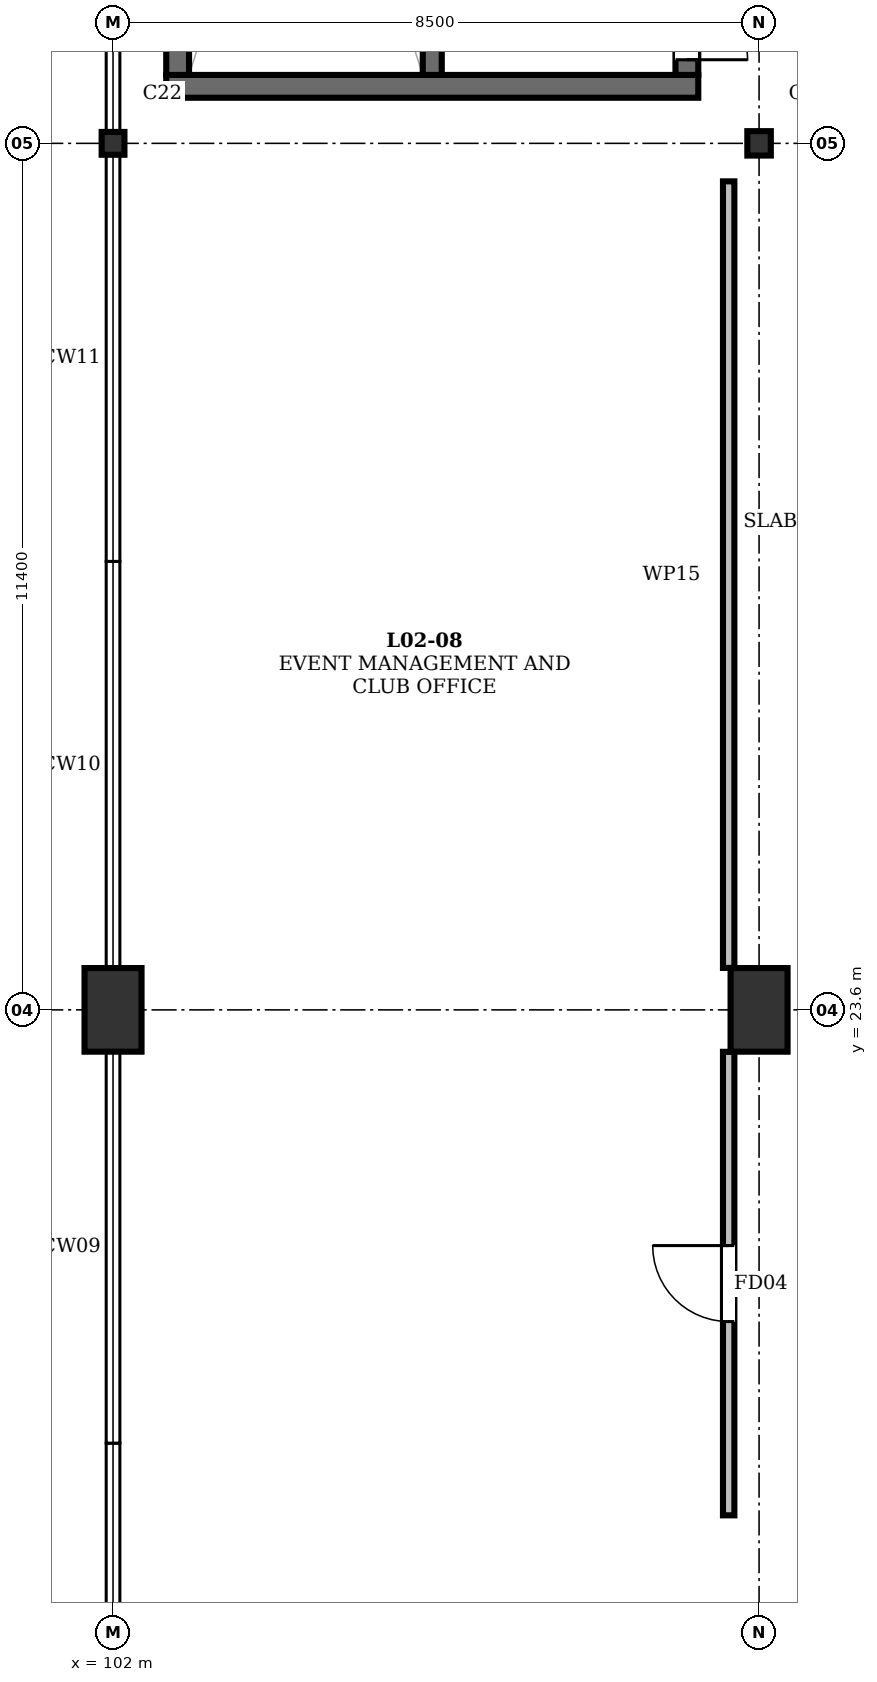
"""IFC4 building model, lengths in metres.
Left out: names, types, materials, properties, quantities, classifications, styles, units other than length and angle.
Written with IfcOpenShell. Run it as: python <this file> out.ifc"""

import sys

from ifc_helpers import new_model, si_unit, direction, frame, frame_2d, origin, origin_2d, place, context, subcontext, project, spatial, rectangle, hollow_rectangle, i_section, extrude, element, fill, save


model = new_model("IFC4")
c1 = context("Model", 3, precision=1e-05, world=origin(), true_north=direction((0.0, 1.0)))
c2 = subcontext(c1, "Body", "Model", "MODEL_VIEW")
j1 = project(units=[si_unit("LENGTHUNIT", "METRE"), si_unit("PLANEANGLEUNIT", "RADIAN")], contexts=[c1])
p1 = place(None, origin())
s1 = spatial("IfcSite", under=j1, at=p1, CompositionType="ELEMENT")
p2 = place(p1, origin())
s2 = spatial("IfcBuilding", under=s1, at=p2, CompositionType="ELEMENT")
p3 = place(p2, frame((0.0, 0.0, 10.2)))
s3 = spatial("IfcBuildingStorey", under=s2, at=p3, CompositionType="ELEMENT", Elevation=10.2)
p4 = place(p3, frame((102.0, 23.6, 0.0), z_axis=(0.0, 0.0, 1.0), x_axis=(1.0, 0.0, 0.0)))
e1 = element("IfcColumn", 1, at=p4, inside=s3, PredefinedType="COLUMN", context=c2, shape_type="SweptSolid", body=[
    extrude(rectangle(XDim=0.75, YDim=1.1, at=origin_2d()), origin(), (0.0, 0.0, 1.0), 4.5),
])
p5 = place(p3, frame((102.0, 35.0, 0.0), z_axis=(0.0, 0.0, 1.0), x_axis=(1.0, 0.0, 0.0)))
e2 = element("IfcColumn", 2, at=p5, inside=s3, PredefinedType="COLUMN", context=c2, shape_type="SweptSolid", body=[
    extrude(hollow_rectangle(XDim=0.3, YDim=0.3, WallThickness=0.012, at=origin_2d()), origin(), (0.0, 0.0, 1.0), 4.5),
])
p6 = place(p3, frame((110.5, 23.6, 0.0), z_axis=(0.0, 0.0, 1.0), x_axis=(1.0, 0.0, 0.0)))
e3 = element("IfcColumn", 3, at=p6, inside=s3, PredefinedType="COLUMN", context=c2, shape_type="SweptSolid", body=[
    extrude(rectangle(XDim=0.75, YDim=1.1, at=origin_2d()), origin(), (0.0, 0.0, 1.0), 4.5),
])
p7 = place(p3, frame((110.5, 35.0, 0.0), z_axis=(0.0, 0.0, 1.0), x_axis=(1.0, 0.0, 0.0)))
e4 = element("IfcColumn", 4, at=p7, inside=s3, PredefinedType="COLUMN", context=c2, shape_type="SweptSolid", body=[
    extrude(i_section(OverallWidth=0.309, OverallDepth=0.321, WebThickness=0.014, FlangeThickness=0.022, at=origin_2d()), origin(), (0.0, 0.0, 1.0), 4.5),
])
p8 = place(p3, frame((102.7, 35.75, 0.0), z_axis=(0.0, 0.0, 1.0), x_axis=(1.0, 0.0, 0.0)))
e5 = element("IfcWall", 5, at=p8, inside=s3, PredefinedType="SHEAR", context=c2, shape_type="SweptSolid", body=[
    extrude(rectangle(XDim=7.0, YDim=0.3, at=frame_2d((3.5, 0.0))), origin(), (0.0, 0.0, 1.0), 4.26),
])
p9 = place(p3, frame((102.85, 35.9, 0.0), z_axis=(0.0, 0.0, 1.0), x_axis=(0.0, 1.0, 0.0)))
e6 = element("IfcWall", 6, at=p9, inside=s3, PredefinedType="SHEAR", context=c2, shape_type="SweptSolid", body=[
    extrude(rectangle(XDim=9.6, YDim=0.3, at=frame_2d((4.8, 0.0))), origin(), (0.0, 0.0, 1.0), 4.26),
])
p10 = place(p9, frame((3.6, 0.0, 0.0)))
e7 = element("IfcOpeningElement", 7, at=p10, cuts=e6, PredefinedType="OPENING", context=c2, shape_type="SweptSolid", body=[
    extrude(rectangle(XDim=1.1, YDim=2.2, at=frame_2d((0.55, 1.1))), frame((0.0, 0.162, 0.0), z_axis=(0.0, -1.0, 0.0), x_axis=(1.0, 0.0, 0.0)), (0.0, 0.0, 1.0), 0.324),
])
p11 = place(p3, frame((109.55, 35.9, 0.0), z_axis=(0.0, 0.0, 1.0), x_axis=(0.0, 1.0, 0.0)))
e8 = element("IfcWall", 8, at=p11, inside=s3, PredefinedType="SHEAR", context=c2, shape_type="SweptSolid", body=[
    extrude(rectangle(XDim=9.6, YDim=0.3, at=frame_2d((4.8, 0.0))), origin(), (0.0, 0.0, 1.0), 4.26),
])
p12 = place(p11, frame((0.2, 0.0, 0.0)))
e9 = element("IfcOpeningElement", 9, at=p12, cuts=e8, PredefinedType="OPENING", context=c2, shape_type="SweptSolid", body=[
    extrude(rectangle(XDim=1.6, YDim=2.2, at=frame_2d((0.8, 1.1))), frame((0.0, 0.162, 0.0), z_axis=(0.0, -1.0, 0.0), x_axis=(1.0, 0.0, 0.0)), (0.0, 0.0, 1.0), 0.324),
])
p13 = place(p3, frame((106.2, 35.9, 0.0), z_axis=(0.0, 0.0, 1.0), x_axis=(0.0, 1.0, 0.0)))
e10 = element("IfcWall", 10, at=p13, inside=s3, PredefinedType="SHEAR", context=c2, shape_type="SweptSolid", body=[
    extrude(rectangle(XDim=9.6, YDim=0.25, at=frame_2d((4.8, 0.0))), origin(), (0.0, 0.0, 1.0), 4.26),
])
p14 = place(p3, frame((110.1, 16.95, 0.0), z_axis=(0.0, 0.0, 1.0), x_axis=(0.0, 1.0, 0.0)))
e11 = element("IfcWall", 11, at=p14, inside=s3, PredefinedType="PARTITIONING", context=c2, shape_type="SweptSolid", body=[
    extrude(rectangle(XDim=6.098, YDim=0.15, at=frame_2d((3.049, 0.0))), origin(), (0.0, 0.0, 1.0), 3.545),
])
p15 = place(p14, frame((2.549, 0.0, 0.0)))
e12 = element("IfcOpeningElement", 12, at=p15, cuts=e11, PredefinedType="OPENING", context=c2, shape_type="SweptSolid", body=[
    extrude(rectangle(XDim=1.0, YDim=2.2, at=frame_2d((0.5, 1.1))), frame((0.0, 0.087, 0.0), z_axis=(0.0, -1.0, 0.0), x_axis=(1.0, 0.0, 0.0)), (0.0, 0.0, 1.0), 0.174),
])
p16 = place(p3, frame((110.1, 24.152, 0.0), z_axis=(0.0, 0.0, 1.0), x_axis=(0.0, 1.0, 0.0)))
e13 = element("IfcWall", 13, at=p16, inside=s3, PredefinedType="PARTITIONING", context=c2, shape_type="SweptSolid", body=[
    extrude(rectangle(XDim=10.348, YDim=0.15, at=frame_2d((5.174, 0.0))), origin(), (0.0, 0.0, 1.0), 3.545),
])
p17 = place(p2, frame((0.0, 0.0, 27.0)))
p18 = place(p17, frame((0.0, 0.0, -12.54)))
p19 = place(p18, frame((106.2, 18.0, 0.0)))
p20 = place(p19, frame((0.0, 0.0, 0.19)))
e14 = element("IfcWindow", 14, at=p20, inside=s3, PartitioningType="SINGLE_PANEL", PredefinedType="LIGHTDOME", context=c2, shape_type="SweptSolid", body=[
    extrude(rectangle(XDim=1.6, YDim=1.6, at=origin_2d()), origin(), (0.0, 0.0, 1.0), 0.05),
])
p21 = place(p12, frame((1.6, 0.0, 0.0), z_axis=(0.0, 0.0, 1.0), x_axis=(-1.0, 0.0, 0.0)))
e15 = element("IfcDoor", 15, at=p21, inside=s3, OperationType="DOUBLE_DOOR_SINGLE_SWING", PredefinedType="DOOR", context=c2, shape_type="SweptSolid", body=[
    extrude(rectangle(XDim=1.6, YDim=2.2, at=frame_2d((0.8, 1.1))), frame((0.0, 0.025, 0.0), z_axis=(0.0, -1.0, 0.0), x_axis=(1.0, 0.0, 0.0)), (0.0, 0.0, 1.0), 0.05),
])
fill(e9, e15)
p22 = place(p15, origin())
e16 = element("IfcDoor", 16, at=p22, inside=s3, OperationType="SINGLE_SWING_RIGHT", PredefinedType="DOOR", context=c2, shape_type="SweptSolid", body=[
    extrude(rectangle(XDim=1.0, YDim=2.2, at=frame_2d((0.5, 1.1))), frame((0.0, 0.025, 0.0), z_axis=(0.0, -1.0, 0.0), x_axis=(1.0, 0.0, 0.0)), (0.0, 0.0, 1.0), 0.05),
])
fill(e12, e16)
save(model, sys.argv[1])
